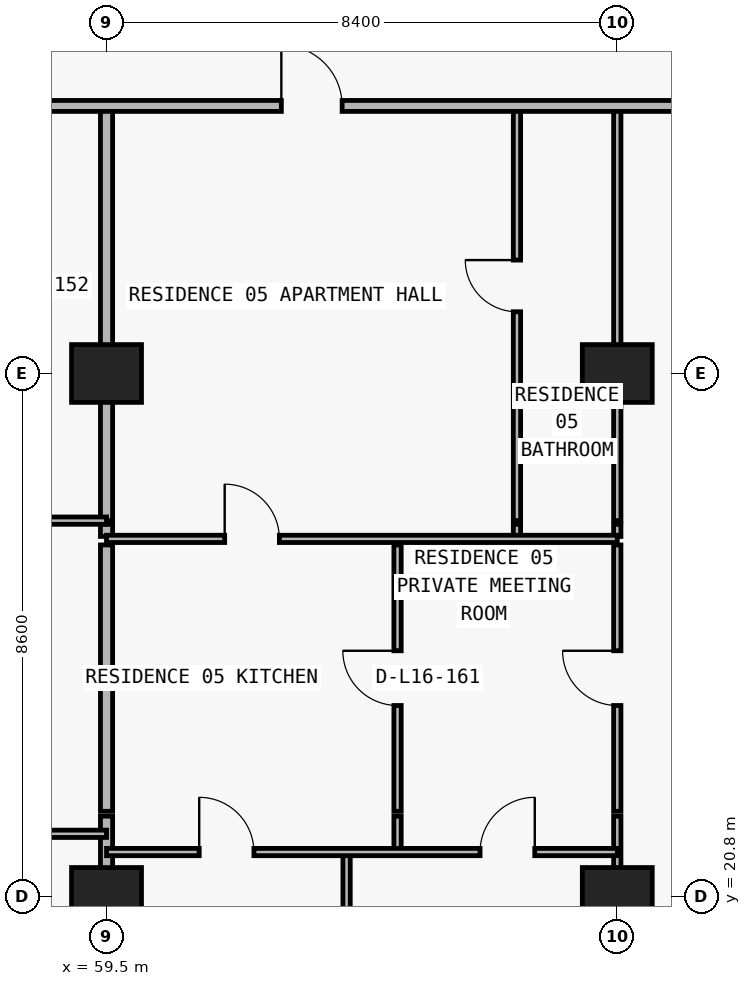
"""IFC4 building model, lengths in metres.
Left out: names, types, materials, properties, quantities, classifications, styles, units other than length and angle.
Written with IfcOpenShell. Run it as: python <this file> out.ifc"""

import sys

from ifc_helpers import new_model, si_unit, direction, frame, frame_2d, origin, origin_2d, place, context, subcontext, project, spatial, rectangle, extrude, element, fill, save


model = new_model("IFC4")
c1 = context("Model", 3, precision=1e-05, world=origin(), true_north=direction((0.0, 1.0)))
c2 = subcontext(c1, "Body", "Model", "MODEL_VIEW")
j1 = project(units=[si_unit("LENGTHUNIT", "METRE"), si_unit("PLANEANGLEUNIT", "RADIAN")], contexts=[c1])
p1 = place(None, origin())
s1 = spatial("IfcSite", under=j1, at=p1, CompositionType="ELEMENT")
p2 = place(p1, origin())
s2 = spatial("IfcBuilding", under=s1, at=p2, CompositionType="ELEMENT")
p3 = place(p2, frame((0.0, 0.0, 63.0)))
s3 = spatial("IfcBuildingStorey", under=s2, at=p3, CompositionType="ELEMENT", Elevation=63.0)
for number, where, z_axis, x_axis in (
    (1, (59.5, 20.8, 0.0), (0.0, 0.0, 1.0), (1.0, 0.0, 0.0)),
    (2, (67.9, 20.8, 0.0), (0.0, 0.0, 1.0), (1.0, 0.0, 0.0)),
    (3, (59.5, 29.4, 0.0), (0.0, 0.0, 1.0), (1.0, 0.0, 0.0)),
    (4, (67.9, 29.4, 0.0), (0.0, 0.0, 1.0), (1.0, 0.0, 0.0)),
):
    element("IfcColumn", number, at=place(p3, frame(where, z_axis=z_axis, x_axis=x_axis)), inside=s3, PredefinedType="COLUMN", context=c2, shape_type="SweptSolid", body=[
        extrude(rectangle(XDim=1.15, YDim=0.95, at=origin_2d()), origin(), (0.0, 0.0, 1.0), 3.05),
    ])
p4 = place(p3, frame((59.5, 6.24, 0.0), z_axis=(0.0, 0.0, 1.0), x_axis=(0.0, 1.0, 0.0)))
e5 = element("IfcWall", 5, at=p4, inside=s3, PredefinedType="PARTITIONING", context=c2, shape_type="SweptSolid", body=[
    extrude(rectangle(XDim=15.88, YDim=0.2, at=frame_2d((7.94, 0.0))), origin(), (0.0, 0.0, 1.0), 2.11),
])
p5 = place(p3, frame((59.5, 22.2, 0.0), z_axis=(0.0, 0.0, 1.0), x_axis=(0.0, 1.0, 0.0)))
e6 = element("IfcWall", 6, at=p5, inside=s3, PredefinedType="PARTITIONING", context=c2, shape_type="SweptSolid", body=[
    extrude(rectangle(XDim=4.38, YDim=0.2, at=frame_2d((2.19, 0.0))), origin(), (0.0, 0.0, 1.0), 2.11),
])
p6 = place(p3, frame((59.5, 26.72, 0.0), z_axis=(0.0, 0.0, 1.0), x_axis=(0.0, 1.0, 0.0)))
e7 = element("IfcWall", 7, at=p6, inside=s3, PredefinedType="PARTITIONING", context=c2, shape_type="SweptSolid", body=[
    extrude(rectangle(XDim=0.2, YDim=0.2, at=frame_2d((0.1, 0.0))), origin(), (0.0, 0.0, 1.0), 2.11),
])
p7 = place(p3, frame((59.5, 26.98, 0.0), z_axis=(0.0, 0.0, 1.0), x_axis=(0.0, 1.0, 0.0)))
e8 = element("IfcWall", 8, at=p7, inside=s3, PredefinedType="PARTITIONING", context=c2, shape_type="SweptSolid", body=[
    extrude(rectangle(XDim=6.82, YDim=0.2, at=frame_2d((3.41, 0.0))), origin(), (0.0, 0.0, 1.0), 2.11),
])
p8 = place(p3, frame((63.448, 6.24, 0.0), z_axis=(0.0, 0.0, 1.0), x_axis=(0.0, 1.0, 0.0)))
e9 = element("IfcWall", 9, at=p8, inside=s3, PredefinedType="PARTITIONING", context=c2, shape_type="SweptSolid", body=[
    extrude(rectangle(XDim=15.29, YDim=0.12, at=frame_2d((7.645, 0.0))), origin(), (0.0, 0.0, 1.0), 3.05),
])
p9 = place(p3, frame((64.286, 21.53, 0.0), z_axis=(0.0, 0.0, 1.0), x_axis=(0.0, 1.0, 0.0)))
e10 = element("IfcWall", 10, at=p9, inside=s3, PredefinedType="PARTITIONING", context=c2, shape_type="SweptSolid", body=[
    extrude(rectangle(XDim=0.59, YDim=0.12, at=frame_2d((0.295, 0.0))), origin(), (0.0, 0.0, 1.0), 3.05),
])
p10 = place(p3, frame((64.286, 22.2, 0.0), z_axis=(0.0, 0.0, 1.0), x_axis=(0.0, 1.0, 0.0)))
e11 = element("IfcWall", 11, at=p10, inside=s3, PredefinedType="PARTITIONING", context=c2, shape_type="SweptSolid", body=[
    extrude(rectangle(XDim=4.38, YDim=0.12, at=frame_2d((2.19, 0.0))), origin(), (0.0, 0.0, 1.0), 3.05),
])
p11 = place(p10, frame((1.74, 0.0, 0.0)))
e12 = element("IfcOpeningElement", 12, at=p11, cuts=e11, PredefinedType="OPENING", context=c2, shape_type="SweptSolid", body=[
    extrude(rectangle(XDim=0.9, YDim=2.15, at=frame_2d((0.45, 1.075))), frame((0.0, 0.07, 0.0), z_axis=(0.0, -1.0, 0.0), x_axis=(1.0, 0.0, 0.0)), (0.0, 0.0, 1.0), 0.14),
])
p12 = place(p3, frame((66.25, 26.72, 0.0), z_axis=(0.0, 0.0, 1.0), x_axis=(0.0, 1.0, 0.0)))
e13 = element("IfcWall", 13, at=p12, inside=s3, PredefinedType="PARTITIONING", context=c2, shape_type="SweptSolid", body=[
    extrude(rectangle(XDim=0.2, YDim=0.12, at=frame_2d((0.1, 0.0))), origin(), (0.0, 0.0, 1.0), 3.05),
])
p13 = place(p3, frame((66.25, 26.98, 0.0), z_axis=(0.0, 0.0, 1.0), x_axis=(0.0, 1.0, 0.0)))
e14 = element("IfcWall", 14, at=p13, inside=s3, PredefinedType="PARTITIONING", context=c2, shape_type="SweptSolid", body=[
    extrude(rectangle(XDim=6.82, YDim=0.12, at=frame_2d((3.41, 0.0))), origin(), (0.0, 0.0, 1.0), 3.05),
])
p14 = place(p13, frame((3.435, 0.0, 0.0)))
e15 = element("IfcOpeningElement", 15, at=p14, cuts=e14, PredefinedType="OPENING", context=c2, shape_type="SweptSolid", body=[
    extrude(rectangle(XDim=0.85, YDim=2.1, at=frame_2d((0.425, 1.05))), frame((0.0, 0.07, 0.0), z_axis=(0.0, -1.0, 0.0), x_axis=(1.0, 0.0, 0.0)), (0.0, 0.0, 1.0), 0.14),
])
p15 = place(p3, frame((67.9, 6.24, 0.0), z_axis=(0.0, 0.0, 1.0), x_axis=(0.0, 1.0, 0.0)))
e16 = element("IfcWall", 16, at=p15, inside=s3, PredefinedType="PARTITIONING", context=c2, shape_type="SweptSolid", body=[
    extrude(rectangle(XDim=15.88, YDim=0.12, at=frame_2d((7.94, 0.0))), origin(), (0.0, 0.0, 1.0), 2.11),
])
p16 = place(p3, frame((67.9, 22.2, 0.0), z_axis=(0.0, 0.0, 1.0), x_axis=(0.0, 1.0, 0.0)))
e17 = element("IfcWall", 17, at=p16, inside=s3, PredefinedType="PARTITIONING", context=c2, shape_type="SweptSolid", body=[
    extrude(rectangle(XDim=4.38, YDim=0.12, at=frame_2d((2.19, 0.0))), origin(), (0.0, 0.0, 1.0), 2.11),
])
p17 = place(p16, frame((1.74, 0.0, 0.0)))
e18 = element("IfcOpeningElement", 18, at=p17, cuts=e17, PredefinedType="OPENING", context=c2, shape_type="SweptSolid", body=[
    extrude(rectangle(XDim=0.9, YDim=2.06, at=frame_2d((0.45, 1.03))), frame((0.0, 0.07, 0.0), z_axis=(0.0, -1.0, 0.0), x_axis=(1.0, 0.0, 0.0)), (0.0, 0.0, 1.0), 0.14),
])
p18 = place(p3, frame((67.9, 26.72, 0.0), z_axis=(0.0, 0.0, 1.0), x_axis=(0.0, 1.0, 0.0)))
e19 = element("IfcWall", 19, at=p18, inside=s3, PredefinedType="PARTITIONING", context=c2, shape_type="SweptSolid", body=[
    extrude(rectangle(XDim=0.2, YDim=0.12, at=frame_2d((0.1, 0.0))), origin(), (0.0, 0.0, 1.0), 2.11),
])
p19 = place(p3, frame((67.9, 26.98, 0.0), z_axis=(0.0, 0.0, 1.0), x_axis=(0.0, 1.0, 0.0)))
e20 = element("IfcWall", 20, at=p19, inside=s3, PredefinedType="PARTITIONING", context=c2, shape_type="SweptSolid", body=[
    extrude(rectangle(XDim=6.82, YDim=0.12, at=frame_2d((3.41, 0.0))), origin(), (0.0, 0.0, 1.0), 2.11),
])
p20 = place(p3, frame((59.5, 21.53, 0.0), z_axis=(0.0, 0.0, 1.0), x_axis=(1.0, 0.0, 0.0)))
e21 = element("IfcWall", 21, at=p20, inside=s3, PredefinedType="PARTITIONING", context=c2, shape_type="SweptSolid", body=[
    extrude(rectangle(XDim=8.4, YDim=0.12, at=frame_2d((4.2, 0.0))), origin(), (0.0, 0.0, 1.0), 3.05),
])
p21 = place(p20, frame((1.524, 0.0, 0.0)))
e22 = element("IfcOpeningElement", 22, at=p21, cuts=e21, PredefinedType="OPENING", context=c2, shape_type="SweptSolid", body=[
    extrude(rectangle(XDim=0.9, YDim=2.15, at=frame_2d((0.45, 1.075))), frame((0.0, 0.07, 0.0), z_axis=(0.0, -1.0, 0.0), x_axis=(1.0, 0.0, 0.0)), (0.0, 0.0, 1.0), 0.14),
])
p22 = place(p20, frame((6.143, 0.0, 0.0)))
e23 = element("IfcOpeningElement", 23, at=p22, cuts=e21, PredefinedType="OPENING", context=c2, shape_type="SweptSolid", body=[
    extrude(rectangle(XDim=0.9, YDim=2.15, at=frame_2d((0.45, 1.075))), frame((0.0, 0.07, 0.0), z_axis=(0.0, -1.0, 0.0), x_axis=(1.0, 0.0, 0.0)), (0.0, 0.0, 1.0), 0.14),
])
p23 = place(p3, frame((51.37, 21.83, 0.0), z_axis=(0.0, 0.0, 1.0), x_axis=(1.0, 0.0, 0.0)))
e24 = element("IfcWall", 24, at=p23, inside=s3, PredefinedType="PARTITIONING", context=c2, shape_type="SweptSolid", body=[
    extrude(rectangle(XDim=8.13, YDim=0.12, at=frame_2d((4.065, 0.0))), origin(), (0.0, 0.0, 1.0), 3.05),
])
p24 = place(p23, frame((1.683, 0.0, 0.0)))
e25 = element("IfcOpeningElement", 25, at=p24, cuts=e24, PredefinedType="OPENING", context=c2, shape_type="SweptSolid", body=[
    extrude(rectangle(XDim=0.9, YDim=2.15, at=frame_2d((0.45, 1.075))), frame((0.0, 0.07, 0.0), z_axis=(0.0, -1.0, 0.0), x_axis=(1.0, 0.0, 0.0)), (0.0, 0.0, 1.0), 0.14),
])
p25 = place(p23, frame((5.79, 0.0, 0.0)))
e26 = element("IfcOpeningElement", 26, at=p25, cuts=e24, PredefinedType="OPENING", context=c2, shape_type="SweptSolid", body=[
    extrude(rectangle(XDim=0.9, YDim=2.15, at=frame_2d((0.45, 1.075))), frame((0.0, 0.07, 0.0), z_axis=(0.0, -1.0, 0.0), x_axis=(1.0, 0.0, 0.0)), (0.0, 0.0, 1.0), 0.14),
])
p26 = place(p3, frame((59.5, 26.68, 0.0), z_axis=(0.0, 0.0, 1.0), x_axis=(1.0, 0.0, 0.0)))
e27 = element("IfcWall", 27, at=p26, inside=s3, PredefinedType="PARTITIONING", context=c2, shape_type="SweptSolid", body=[
    extrude(rectangle(XDim=8.4, YDim=0.12, at=frame_2d((4.2, 0.0))), origin(), (0.0, 0.0, 1.0), 3.05),
])
p27 = place(p26, frame((1.943, 0.0, 0.0)))
e28 = element("IfcOpeningElement", 28, at=p27, cuts=e27, PredefinedType="OPENING", context=c2, shape_type="SweptSolid", body=[
    extrude(rectangle(XDim=0.9, YDim=2.15, at=frame_2d((0.45, 1.075))), frame((0.0, 0.07, 0.0), z_axis=(0.0, -1.0, 0.0), x_axis=(1.0, 0.0, 0.0)), (0.0, 0.0, 1.0), 0.14),
])
p28 = place(p3, frame((51.37, 26.98, 0.0), z_axis=(0.0, 0.0, 1.0), x_axis=(1.0, 0.0, 0.0)))
e29 = element("IfcWall", 29, at=p28, inside=s3, PredefinedType="PARTITIONING", context=c2, shape_type="SweptSolid", body=[
    extrude(rectangle(XDim=8.13, YDim=0.12, at=frame_2d((4.065, 0.0))), origin(), (0.0, 0.0, 1.0), 3.05),
])
p29 = place(p28, frame((1.683, 0.0, 0.0)))
e30 = element("IfcOpeningElement", 30, at=p29, cuts=e29, PredefinedType="OPENING", context=c2, shape_type="SweptSolid", body=[
    extrude(rectangle(XDim=0.9, YDim=2.15, at=frame_2d((0.45, 1.075))), frame((0.0, 0.07, 0.0), z_axis=(0.0, -1.0, 0.0), x_axis=(1.0, 0.0, 0.0)), (0.0, 0.0, 1.0), 0.14),
])
p30 = place(p3, frame((26.7, 33.8, 0.0), z_axis=(0.0, 0.0, 1.0), x_axis=(1.0, 0.0, 0.0)))
e31 = element("IfcWall", 31, at=p30, inside=s3, PredefinedType="PARTITIONING", context=c2, shape_type="SweptSolid", body=[
    extrude(rectangle(XDim=46.0, YDim=0.18, at=frame_2d((23.0, 0.0))), origin(), (0.0, 0.0, 1.0), 3.05),
])
p31 = place(p30, frame((2.95, 0.0, 0.0)))
e32 = element("IfcOpeningElement", 32, at=p31, cuts=e31, PredefinedType="OPENING", context=c2, shape_type="SweptSolid", body=[
    extrude(rectangle(XDim=1.0, YDim=2.2, at=frame_2d((0.5, 1.1))), frame((0.0, 0.1, 0.0), z_axis=(0.0, -1.0, 0.0), x_axis=(1.0, 0.0, 0.0)), (0.0, 0.0, 1.0), 0.2),
])
p32 = place(p30, frame((18.875, 0.0, 0.0)))
e33 = element("IfcOpeningElement", 33, at=p32, cuts=e31, PredefinedType="OPENING", context=c2, shape_type="SweptSolid", body=[
    extrude(rectangle(XDim=1.0, YDim=2.2, at=frame_2d((0.5, 1.1))), frame((0.0, 0.1, 0.0), z_axis=(0.0, -1.0, 0.0), x_axis=(1.0, 0.0, 0.0)), (0.0, 0.0, 1.0), 0.2),
])
p33 = place(p30, frame((27.275, 0.0, 0.0)))
e34 = element("IfcOpeningElement", 34, at=p33, cuts=e31, PredefinedType="OPENING", context=c2, shape_type="SweptSolid", body=[
    extrude(rectangle(XDim=1.0, YDim=2.2, at=frame_2d((0.5, 1.1))), frame((0.0, 0.1, 0.0), z_axis=(0.0, -1.0, 0.0), x_axis=(1.0, 0.0, 0.0)), (0.0, 0.0, 1.0), 0.2),
])
p34 = place(p30, frame((35.675, 0.0, 0.0)))
e35 = element("IfcOpeningElement", 35, at=p34, cuts=e31, PredefinedType="OPENING", context=c2, shape_type="SweptSolid", body=[
    extrude(rectangle(XDim=1.0, YDim=2.2, at=frame_2d((0.5, 1.1))), frame((0.0, 0.1, 0.0), z_axis=(0.0, -1.0, 0.0), x_axis=(1.0, 0.0, 0.0)), (0.0, 0.0, 1.0), 0.2),
])
p35 = place(p34, origin())
e36 = element("IfcDoor", 36, at=p35, inside=s3, OperationType="SINGLE_SWING_LEFT", PredefinedType="DOOR", context=c2, shape_type="SweptSolid", body=[
    extrude(rectangle(XDim=1.0, YDim=2.2, at=frame_2d((0.5, 1.1))), frame((0.0, 0.025, 0.0), z_axis=(0.0, -1.0, 0.0), x_axis=(1.0, 0.0, 0.0)), (0.0, 0.0, 1.0), 0.05),
])
fill(e35, e36)
p36 = place(p14, origin())
e37 = element("IfcDoor", 37, at=p36, inside=s3, OperationType="SINGLE_SWING_RIGHT", PredefinedType="DOOR", context=c2, shape_type="SweptSolid", body=[
    extrude(rectangle(XDim=0.85, YDim=2.1, at=frame_2d((0.425, 1.05))), frame((0.0, 0.025, 0.0), z_axis=(0.0, -1.0, 0.0), x_axis=(1.0, 0.0, 0.0)), (0.0, 0.0, 1.0), 0.05),
])
fill(e15, e37)
p37 = place(p27, origin())
e38 = element("IfcDoor", 38, at=p37, inside=s3, OperationType="SINGLE_SWING_LEFT", PredefinedType="DOOR", context=c2, shape_type="SweptSolid", body=[
    extrude(rectangle(XDim=0.9, YDim=2.15, at=frame_2d((0.45, 1.075))), frame((0.0, 0.025, 0.0), z_axis=(0.0, -1.0, 0.0), x_axis=(1.0, 0.0, 0.0)), (0.0, 0.0, 1.0), 0.05),
])
fill(e28, e38)
p38 = place(p11, origin())
e39 = element("IfcDoor", 39, at=p38, inside=s3, OperationType="SINGLE_SWING_RIGHT", PredefinedType="DOOR", context=c2, shape_type="SweptSolid", body=[
    extrude(rectangle(XDim=0.9, YDim=2.15, at=frame_2d((0.45, 1.075))), frame((0.0, 0.025, 0.0), z_axis=(0.0, -1.0, 0.0), x_axis=(1.0, 0.0, 0.0)), (0.0, 0.0, 1.0), 0.05),
])
fill(e12, e39)
p39 = place(p21, origin())
e40 = element("IfcDoor", 40, at=p39, inside=s3, OperationType="SINGLE_SWING_LEFT", PredefinedType="DOOR", context=c2, shape_type="SweptSolid", body=[
    extrude(rectangle(XDim=0.9, YDim=2.15, at=frame_2d((0.45, 1.075))), frame((0.0, 0.025, 0.0), z_axis=(0.0, -1.0, 0.0), x_axis=(1.0, 0.0, 0.0)), (0.0, 0.0, 1.0), 0.05),
])
fill(e22, e40)
p40 = place(p22, origin())
e41 = element("IfcDoor", 41, at=p40, inside=s3, OperationType="SINGLE_SWING_RIGHT", PredefinedType="DOOR", context=c2, shape_type="SweptSolid", body=[
    extrude(rectangle(XDim=0.9, YDim=2.15, at=frame_2d((0.45, 1.075))), frame((0.0, 0.025, 0.0), z_axis=(0.0, -1.0, 0.0), x_axis=(1.0, 0.0, 0.0)), (0.0, 0.0, 1.0), 0.05),
])
fill(e23, e41)
p41 = place(p17, origin())
e42 = element("IfcDoor", 42, at=p41, inside=s3, OperationType="SINGLE_SWING_RIGHT", PredefinedType="DOOR", context=c2, shape_type="SweptSolid", body=[
    extrude(rectangle(XDim=0.9, YDim=2.06, at=frame_2d((0.45, 1.03))), frame((0.0, 0.025, 0.0), z_axis=(0.0, -1.0, 0.0), x_axis=(1.0, 0.0, 0.0)), (0.0, 0.0, 1.0), 0.05),
])
fill(e18, e42)
save(model, sys.argv[1])
